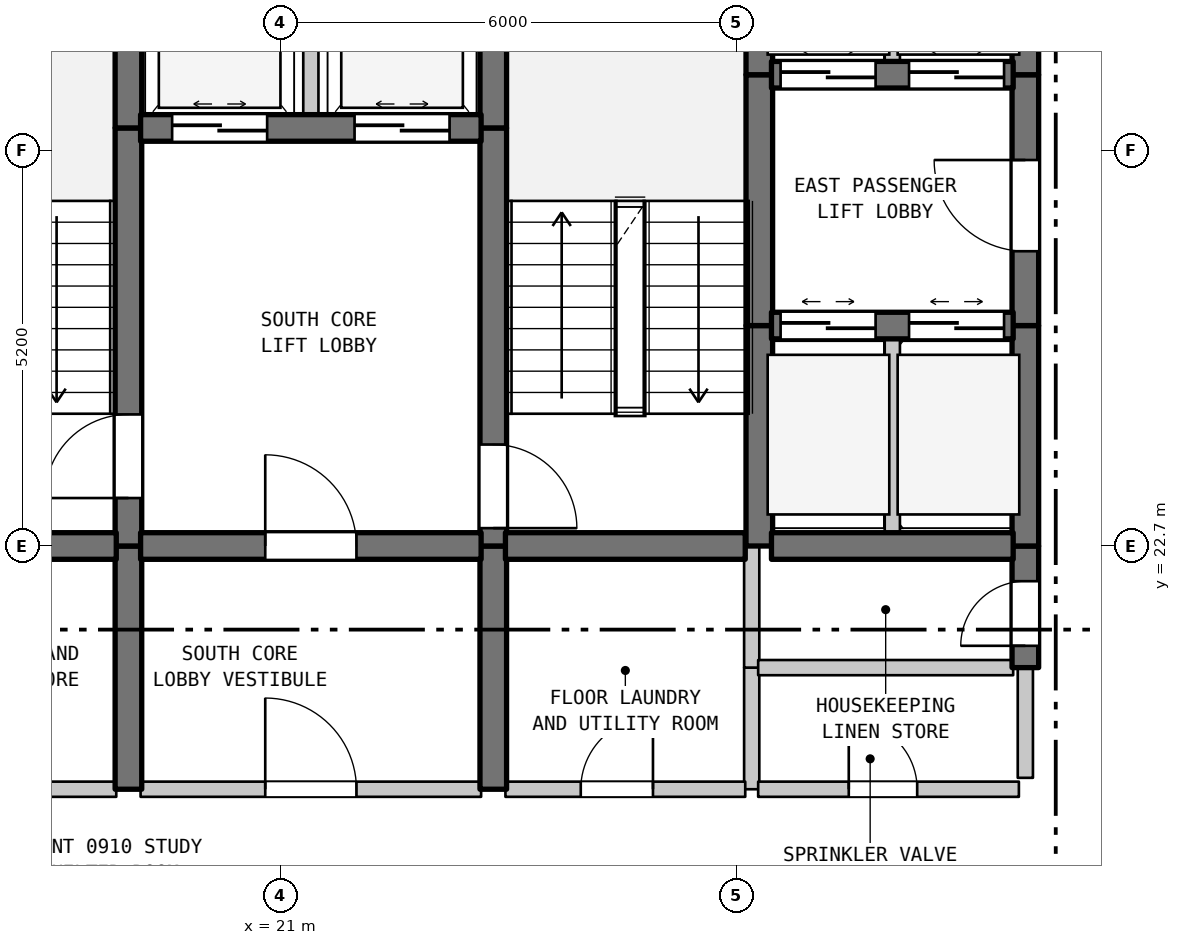
"""IFC4 building model, lengths in metres.
Left out: names, types, materials, properties, quantities, classifications, styles, units other than length and angle.
Written with IfcOpenShell. Run it as: python <this file> out.ifc"""

import sys

from ifc_helpers import new_model, si_unit, direction, frame, frame_2d, origin, place, context, subcontext, project, spatial, rectangle, extrude, element, fill, save


model = new_model("IFC4")
c1 = context("Model", 3, precision=1e-05, world=origin(), true_north=direction((0.0, 1.0)))
c2 = subcontext(c1, "Body", "Model", "MODEL_VIEW")
j1 = project(units=[si_unit("LENGTHUNIT", "METRE"), si_unit("PLANEANGLEUNIT", "RADIAN")], contexts=[c1])
p1 = place(None, origin())
s1 = spatial("IfcSite", under=j1, at=p1, CompositionType="ELEMENT")
p2 = place(p1, origin())
s2 = spatial("IfcBuilding", under=s1, at=p2, CompositionType="ELEMENT")
p3 = place(p2, frame((0.0, 0.0, 42.5)))
s3 = spatial("IfcBuildingStorey", under=s2, at=p3, CompositionType="ELEMENT", Elevation=42.5)
p4 = place(p3, frame((19.0, 19.5, 0.0), z_axis=(0.0, 0.0, 1.0), x_axis=(0.0, 1.0, 0.0)))
e1 = element("IfcWall", 1, at=p4, inside=s3, PredefinedType="SHEAR", context=c2, shape_type="SweptSolid", body=[
    extrude(rectangle(XDim=3.2, YDim=0.35, at=frame_2d((1.6, 0.0))), origin(), (0.0, 0.0, 1.0), 3.385),
])
p5 = place(p3, frame((19.0, 22.7, 0.0), z_axis=(0.0, 0.0, 1.0), x_axis=(0.0, 1.0, 0.0)))
e2 = element("IfcWall", 2, at=p5, inside=s3, PredefinedType="SHEAR", context=c2, shape_type="SweptSolid", body=[
    extrude(rectangle(XDim=5.5, YDim=0.35, at=frame_2d((2.75, 0.0))), origin(), (0.0, 0.0, 1.0), 3.385),
])
p6 = place(p5, frame((0.631, 0.0, 0.0)))
e3 = element("IfcOpeningElement", 3, at=p6, cuts=e2, PredefinedType="OPENING", context=c2, shape_type="SweptSolid", body=[
    extrude(rectangle(XDim=1.1, YDim=2.15, at=frame_2d((0.55, 1.075))), frame((0.0, 0.185, 0.0), z_axis=(0.0, -1.0, 0.0), x_axis=(1.0, 0.0, 0.0)), (0.0, 0.0, 1.0), 0.37),
])
p7 = place(p3, frame((19.0, 28.2, 0.0), z_axis=(0.0, 0.0, 1.0), x_axis=(0.0, 1.0, 0.0)))
e4 = element("IfcWall", 4, at=p7, inside=s3, PredefinedType="SHEAR", context=c2, shape_type="SweptSolid", body=[
    extrude(rectangle(XDim=1.3, YDim=0.35, at=frame_2d((0.65, 0.0))), origin(), (0.0, 0.0, 1.0), 3.385),
])
p8 = place(p3, frame((21.4, 28.2, 0.0), z_axis=(0.0, 0.0, 1.0), x_axis=(0.0, 1.0, 0.0)))
e5 = element("IfcWall", 5, at=p8, inside=s3, PredefinedType="STANDARD", context=c2, shape_type="SweptSolid", body=[
    extrude(rectangle(XDim=2.6, YDim=0.2, at=frame_2d((1.3, 0.0))), origin(), (0.0, 0.0, 1.0), 3.385),
])
p9 = place(p3, frame((23.8, 19.5, 0.0), z_axis=(0.0, 0.0, 1.0), x_axis=(0.0, 1.0, 0.0)))
e6 = element("IfcWall", 6, at=p9, inside=s3, PredefinedType="SHEAR", context=c2, shape_type="SweptSolid", body=[
    extrude(rectangle(XDim=3.2, YDim=0.35, at=frame_2d((1.6, 0.0))), origin(), (0.0, 0.0, 1.0), 3.385),
])
p10 = place(p3, frame((23.8, 22.7, 0.0), z_axis=(0.0, 0.0, 1.0), x_axis=(0.0, 1.0, 0.0)))
e7 = element("IfcWall", 7, at=p10, inside=s3, PredefinedType="SHEAR", context=c2, shape_type="SweptSolid", body=[
    extrude(rectangle(XDim=5.5, YDim=0.35, at=frame_2d((2.75, 0.0))), origin(), (0.0, 0.0, 1.0), 3.385),
])
p11 = place(p10, frame((0.235, 0.0, 0.0)))
e8 = element("IfcOpeningElement", 8, at=p11, cuts=e7, PredefinedType="OPENING", context=c2, shape_type="SweptSolid", body=[
    extrude(rectangle(XDim=1.1, YDim=2.15, at=frame_2d((0.55, 1.075))), frame((0.0, 0.185, 0.0), z_axis=(0.0, -1.0, 0.0), x_axis=(1.0, 0.0, 0.0)), (0.0, 0.0, 1.0), 0.37),
])
p12 = place(p3, frame((23.8, 28.2, 0.0), z_axis=(0.0, 0.0, 1.0), x_axis=(0.0, 1.0, 0.0)))
e9 = element("IfcWall", 9, at=p12, inside=s3, PredefinedType="SHEAR", context=c2, shape_type="SweptSolid", body=[
    extrude(rectangle(XDim=1.3, YDim=0.35, at=frame_2d((0.65, 0.0))), origin(), (0.0, 0.0, 1.0), 3.385),
])
p13 = place(p3, frame((27.2, 19.5, 0.0), z_axis=(0.0, 0.0, 1.0), x_axis=(0.0, 1.0, 0.0)))
e10 = element("IfcWall", 10, at=p13, inside=s3, PredefinedType="STANDARD", context=c2, shape_type="SweptSolid", body=[
    extrude(rectangle(XDim=1.6, YDim=0.2, at=frame_2d((0.8, 0.0))), origin(), (0.0, 0.0, 1.0), 3.385),
])
p14 = place(p3, frame((27.2, 21.1, 0.0), z_axis=(0.0, 0.0, 1.0), x_axis=(0.0, 1.0, 0.0)))
e11 = element("IfcWall", 11, at=p14, inside=s3, PredefinedType="STANDARD", context=c2, shape_type="SweptSolid", body=[
    extrude(rectangle(XDim=1.6, YDim=0.2, at=frame_2d((0.8, 0.0))), origin(), (0.0, 0.0, 1.0), 3.385),
])
p15 = place(p3, frame((27.3, 22.7, 0.0), z_axis=(0.0, 0.0, 1.0), x_axis=(0.0, 1.0, 0.0)))
e12 = element("IfcWall", 12, at=p15, inside=s3, PredefinedType="SHEAR", context=c2, shape_type="SweptSolid", body=[
    extrude(rectangle(XDim=2.9, YDim=0.35, at=frame_2d((1.45, 0.0))), origin(), (0.0, 0.0, 1.0), 3.385),
])
p16 = place(p3, frame((27.3, 25.6, 0.0), z_axis=(0.0, 0.0, 1.0), x_axis=(0.0, 1.0, 0.0)))
e13 = element("IfcWall", 13, at=p16, inside=s3, PredefinedType="SHEAR", context=c2, shape_type="SweptSolid", body=[
    extrude(rectangle(XDim=3.3, YDim=0.35, at=frame_2d((1.65, 0.0))), origin(), (0.0, 0.0, 1.0), 3.385),
])
p17 = place(p3, frame((27.3, 28.9, 0.0), z_axis=(0.0, 0.0, 1.0), x_axis=(0.0, 1.0, 0.0)))
e14 = element("IfcWall", 14, at=p17, inside=s3, PredefinedType="SHEAR", context=c2, shape_type="SweptSolid", body=[
    extrude(rectangle(XDim=0.6, YDim=0.35, at=frame_2d((0.3, 0.0))), origin(), (0.0, 0.0, 1.0), 3.385),
])
p18 = place(p3, frame((29.05, 22.7, 0.0), z_axis=(0.0, 0.0, 1.0), x_axis=(0.0, 1.0, 0.0)))
e15 = element("IfcWall", 15, at=p18, inside=s3, PredefinedType="STANDARD", context=c2, shape_type="SweptSolid", body=[
    extrude(rectangle(XDim=2.9, YDim=0.2, at=frame_2d((1.45, 0.0))), origin(), (0.0, 0.0, 1.0), 3.385),
])
p19 = place(p3, frame((29.05, 28.9, 0.0), z_axis=(0.0, 0.0, 1.0), x_axis=(0.0, 1.0, 0.0)))
e16 = element("IfcWall", 16, at=p19, inside=s3, PredefinedType="STANDARD", context=c2, shape_type="SweptSolid", body=[
    extrude(rectangle(XDim=2.6, YDim=0.2, at=frame_2d((1.3, 0.0))), origin(), (0.0, 0.0, 1.0), 3.385),
])
p20 = place(p3, frame((30.8, 19.65, 0.0), z_axis=(0.0, 0.0, 1.0), x_axis=(0.0, 1.0, 0.0)))
e17 = element("IfcWall", 17, at=p20, inside=s3, PredefinedType="STANDARD", context=c2, shape_type="SweptSolid", body=[
    extrude(rectangle(XDim=1.45, YDim=0.2, at=frame_2d((0.725, 0.0))), origin(), (0.0, 0.0, 1.0), 3.385),
])
p21 = place(p3, frame((30.8, 21.1, 0.0), z_axis=(0.0, 0.0, 1.0), x_axis=(0.0, 1.0, 0.0)))
e18 = element("IfcWall", 18, at=p21, inside=s3, PredefinedType="SHEAR", context=c2, shape_type="SweptSolid", body=[
    extrude(rectangle(XDim=1.6, YDim=0.35, at=frame_2d((0.8, 0.0))), origin(), (0.0, 0.0, 1.0), 3.385),
])
p22 = place(p21, frame((0.287, 0.0, 0.0)))
e19 = element("IfcOpeningElement", 19, at=p22, cuts=e18, PredefinedType="OPENING", context=c2, shape_type="SweptSolid", body=[
    extrude(rectangle(XDim=0.85, YDim=2.1, at=frame_2d((0.425, 1.05))), frame((0.0, 0.185, 0.0), z_axis=(0.0, -1.0, 0.0), x_axis=(1.0, 0.0, 0.0)), (0.0, 0.0, 1.0), 0.37),
])
p23 = place(p3, frame((30.8, 22.7, 0.0), z_axis=(0.0, 0.0, 1.0), x_axis=(0.0, 1.0, 0.0)))
e20 = element("IfcWall", 20, at=p23, inside=s3, PredefinedType="SHEAR", context=c2, shape_type="SweptSolid", body=[
    extrude(rectangle(XDim=2.9, YDim=0.35, at=frame_2d((1.45, 0.0))), origin(), (0.0, 0.0, 1.0), 3.385),
])
p24 = place(p3, frame((30.8, 25.6, 0.0), z_axis=(0.0, 0.0, 1.0), x_axis=(0.0, 1.0, 0.0)))
e21 = element("IfcWall", 21, at=p24, inside=s3, PredefinedType="SHEAR", context=c2, shape_type="SweptSolid", body=[
    extrude(rectangle(XDim=3.3, YDim=0.35, at=frame_2d((1.65, 0.0))), origin(), (0.0, 0.0, 1.0), 3.385),
])
p25 = place(p24, frame((0.978, 0.0, 0.0)))
e22 = element("IfcOpeningElement", 22, at=p25, cuts=e21, PredefinedType="OPENING", context=c2, shape_type="SweptSolid", body=[
    extrude(rectangle(XDim=1.2, YDim=2.2, at=frame_2d((0.6, 1.1))), frame((0.0, 0.185, 0.0), z_axis=(0.0, -1.0, 0.0), x_axis=(1.0, 0.0, 0.0)), (0.0, 0.0, 1.0), 0.37),
])
p26 = place(p3, frame((30.8, 28.9, 0.0), z_axis=(0.0, 0.0, 1.0), x_axis=(0.0, 1.0, 0.0)))
e23 = element("IfcWall", 23, at=p26, inside=s3, PredefinedType="SHEAR", context=c2, shape_type="SweptSolid", body=[
    extrude(rectangle(XDim=2.6, YDim=0.35, at=frame_2d((1.3, 0.0))), origin(), (0.0, 0.0, 1.0), 3.385),
])
p27 = place(p3, frame((15.16, 19.5, 0.0), z_axis=(0.0, 0.0, 1.0), x_axis=(1.0, 0.0, 0.0)))
e24 = element("IfcWall", 24, at=p27, inside=s3, PredefinedType="STANDARD", context=c2, shape_type="SweptSolid", body=[
    extrude(rectangle(XDim=3.68, YDim=0.2, at=frame_2d((1.84, 0.0))), origin(), (0.0, 0.0, 1.0), 3.385),
])
p28 = place(p27, frame((1.39, 0.0, 0.0)))
e25 = element("IfcOpeningElement", 25, at=p28, cuts=e24, PredefinedType="OPENING", context=c2, shape_type="SweptSolid", body=[
    extrude(rectangle(XDim=0.9, YDim=2.15, at=frame_2d((0.45, 1.075))), frame((0.0, 0.11, 0.0), z_axis=(0.0, -1.0, 0.0), x_axis=(1.0, 0.0, 0.0)), (0.0, 0.0, 1.0), 0.22),
])
p29 = place(p3, frame((19.16, 19.5, 0.0), z_axis=(0.0, 0.0, 1.0), x_axis=(1.0, 0.0, 0.0)))
e26 = element("IfcWall", 26, at=p29, inside=s3, PredefinedType="STANDARD", context=c2, shape_type="SweptSolid", body=[
    extrude(rectangle(XDim=4.48, YDim=0.2, at=frame_2d((2.24, 0.0))), origin(), (0.0, 0.0, 1.0), 3.385),
])
p30 = place(p29, frame((1.64, 0.0, 0.0)))
e27 = element("IfcOpeningElement", 27, at=p30, cuts=e26, PredefinedType="OPENING", context=c2, shape_type="SweptSolid", body=[
    extrude(rectangle(XDim=1.2, YDim=2.2, at=frame_2d((0.6, 1.1))), frame((0.0, 0.11, 0.0), z_axis=(0.0, -1.0, 0.0), x_axis=(1.0, 0.0, 0.0)), (0.0, 0.0, 1.0), 0.22),
])
p31 = place(p3, frame((23.96, 19.5, 0.0), z_axis=(0.0, 0.0, 1.0), x_axis=(1.0, 0.0, 0.0)))
e28 = element("IfcWall", 28, at=p31, inside=s3, PredefinedType="STANDARD", context=c2, shape_type="SweptSolid", body=[
    extrude(rectangle(XDim=3.155, YDim=0.2, at=frame_2d((1.578, 0.0))), origin(), (0.0, 0.0, 1.0), 3.385),
])
p32 = place(p31, frame((0.991, 0.0, 0.0)))
e29 = element("IfcOpeningElement", 29, at=p32, cuts=e28, PredefinedType="OPENING", context=c2, shape_type="SweptSolid", body=[
    extrude(rectangle(XDim=0.95, YDim=2.15, at=frame_2d((0.475, 1.075))), frame((0.0, 0.11, 0.0), z_axis=(0.0, -1.0, 0.0), x_axis=(1.0, 0.0, 0.0)), (0.0, 0.0, 1.0), 0.22),
])
p33 = place(p3, frame((27.285, 19.5, 0.0), z_axis=(0.0, 0.0, 1.0), x_axis=(1.0, 0.0, 0.0)))
e30 = element("IfcWall", 30, at=p33, inside=s3, PredefinedType="STANDARD", context=c2, shape_type="SweptSolid", body=[
    extrude(rectangle(XDim=3.43, YDim=0.2, at=frame_2d((1.715, 0.0))), origin(), (0.0, 0.0, 1.0), 3.385),
])
p34 = place(p33, frame((1.192, 0.0, 0.0)))
e31 = element("IfcOpeningElement", 31, at=p34, cuts=e30, PredefinedType="OPENING", context=c2, shape_type="SweptSolid", body=[
    extrude(rectangle(XDim=0.9, YDim=2.15, at=frame_2d((0.45, 1.075))), frame((0.0, 0.11, 0.0), z_axis=(0.0, -1.0, 0.0), x_axis=(1.0, 0.0, 0.0)), (0.0, 0.0, 1.0), 0.22),
])
p35 = place(p3, frame((27.285, 21.1, 0.0), z_axis=(0.0, 0.0, 1.0), x_axis=(1.0, 0.0, 0.0)))
e32 = element("IfcWall", 32, at=p35, inside=s3, PredefinedType="STANDARD", context=c2, shape_type="SweptSolid", body=[
    extrude(rectangle(XDim=3.355, YDim=0.2, at=frame_2d((1.677, 0.0))), origin(), (0.0, 0.0, 1.0), 3.385),
])
p36 = place(p3, frame((15.16, 22.7, 0.0), z_axis=(0.0, 0.0, 1.0), x_axis=(1.0, 0.0, 0.0)))
e33 = element("IfcWall", 33, at=p36, inside=s3, PredefinedType="SHEAR", context=c2, shape_type="SweptSolid", body=[
    extrude(rectangle(XDim=3.68, YDim=0.35, at=frame_2d((1.84, 0.0))), origin(), (0.0, 0.0, 1.0), 3.385),
])
p37 = place(p3, frame((19.16, 22.7, 0.0), z_axis=(0.0, 0.0, 1.0), x_axis=(1.0, 0.0, 0.0)))
e34 = element("IfcWall", 34, at=p37, inside=s3, PredefinedType="SHEAR", context=c2, shape_type="SweptSolid", body=[
    extrude(rectangle(XDim=4.48, YDim=0.35, at=frame_2d((2.24, 0.0))), origin(), (0.0, 0.0, 1.0), 3.385),
])
p38 = place(p37, frame((1.64, 0.0, 0.0)))
e35 = element("IfcOpeningElement", 35, at=p38, cuts=e34, PredefinedType="OPENING", context=c2, shape_type="SweptSolid", body=[
    extrude(rectangle(XDim=1.2, YDim=2.2, at=frame_2d((0.6, 1.1))), frame((0.0, 0.185, 0.0), z_axis=(0.0, -1.0, 0.0), x_axis=(1.0, 0.0, 0.0)), (0.0, 0.0, 1.0), 0.37),
])
p39 = place(p3, frame((23.96, 22.7, 0.0), z_axis=(0.0, 0.0, 1.0), x_axis=(1.0, 0.0, 0.0)))
e36 = element("IfcWall", 36, at=p39, inside=s3, PredefinedType="SHEAR", context=c2, shape_type="SweptSolid", body=[
    extrude(rectangle(XDim=3.155, YDim=0.35, at=frame_2d((1.578, 0.0))), origin(), (0.0, 0.0, 1.0), 3.385),
])
p40 = place(p3, frame((27.46, 22.7, 0.0), z_axis=(0.0, 0.0, 1.0), x_axis=(1.0, 0.0, 0.0)))
e37 = element("IfcWall", 37, at=p40, inside=s3, PredefinedType="SHEAR", context=c2, shape_type="SweptSolid", body=[
    extrude(rectangle(XDim=3.18, YDim=0.35, at=frame_2d((1.59, 0.0))), origin(), (0.0, 0.0, 1.0), 3.385),
])
p41 = place(p3, frame((27.46, 25.6, 0.0), z_axis=(0.0, 0.0, 1.0), x_axis=(1.0, 0.0, 0.0)))
e38 = element("IfcWall", 38, at=p41, inside=s3, PredefinedType="SHEAR", context=c2, shape_type="SweptSolid", body=[
    extrude(rectangle(XDim=3.18, YDim=0.35, at=frame_2d((1.59, 0.0))), origin(), (0.0, 0.0, 1.0), 3.385),
])
p42 = place(p41, frame((0.12, 0.0, 0.0)))
e39 = element("IfcOpeningElement", 39, at=p42, cuts=e38, PredefinedType="OPENING", context=c2, shape_type="SweptSolid", body=[
    extrude(rectangle(XDim=1.25, YDim=2.2, at=frame_2d((0.625, 1.1))), frame((0.0, 0.185, 0.0), z_axis=(0.0, -1.0, 0.0), x_axis=(1.0, 0.0, 0.0)), (0.0, 0.0, 1.0), 0.37),
])
p43 = place(p41, frame((1.81, 0.0, 0.0)))
e40 = element("IfcOpeningElement", 40, at=p43, cuts=e38, PredefinedType="OPENING", context=c2, shape_type="SweptSolid", body=[
    extrude(rectangle(XDim=1.25, YDim=2.2, at=frame_2d((0.625, 1.1))), frame((0.0, 0.185, 0.0), z_axis=(0.0, -1.0, 0.0), x_axis=(1.0, 0.0, 0.0)), (0.0, 0.0, 1.0), 0.37),
])
p44 = place(p3, frame((19.16, 28.2, 0.0), z_axis=(0.0, 0.0, 1.0), x_axis=(1.0, 0.0, 0.0)))
e41 = element("IfcWall", 41, at=p44, inside=s3, PredefinedType="SHEAR", context=c2, shape_type="SweptSolid", body=[
    extrude(rectangle(XDim=4.48, YDim=0.35, at=frame_2d((2.24, 0.0))), origin(), (0.0, 0.0, 1.0), 3.385),
])
p45 = place(p44, frame((0.415, 0.0, 0.0)))
e42 = element("IfcOpeningElement", 42, at=p45, cuts=e41, PredefinedType="OPENING", context=c2, shape_type="SweptSolid", body=[
    extrude(rectangle(XDim=1.25, YDim=2.2, at=frame_2d((0.625, 1.1))), frame((0.0, 0.185, 0.0), z_axis=(0.0, -1.0, 0.0), x_axis=(1.0, 0.0, 0.0)), (0.0, 0.0, 1.0), 0.37),
])
p46 = place(p44, frame((2.815, 0.0, 0.0)))
e43 = element("IfcOpeningElement", 43, at=p46, cuts=e41, PredefinedType="OPENING", context=c2, shape_type="SweptSolid", body=[
    extrude(rectangle(XDim=1.25, YDim=2.2, at=frame_2d((0.625, 1.1))), frame((0.0, 0.185, 0.0), z_axis=(0.0, -1.0, 0.0), x_axis=(1.0, 0.0, 0.0)), (0.0, 0.0, 1.0), 0.37),
])
p47 = place(p3, frame((27.46, 28.9, 0.0), z_axis=(0.0, 0.0, 1.0), x_axis=(1.0, 0.0, 0.0)))
e44 = element("IfcWall", 44, at=p47, inside=s3, PredefinedType="SHEAR", context=c2, shape_type="SweptSolid", body=[
    extrude(rectangle(XDim=3.18, YDim=0.35, at=frame_2d((1.59, 0.0))), origin(), (0.0, 0.0, 1.0), 3.385),
])
p48 = place(p47, frame((0.12, 0.0, 0.0)))
e45 = element("IfcOpeningElement", 45, at=p48, cuts=e44, PredefinedType="OPENING", context=c2, shape_type="SweptSolid", body=[
    extrude(rectangle(XDim=1.25, YDim=2.2, at=frame_2d((0.625, 1.1))), frame((0.0, 0.185, 0.0), z_axis=(0.0, -1.0, 0.0), x_axis=(1.0, 0.0, 0.0)), (0.0, 0.0, 1.0), 0.37),
])
p49 = place(p47, frame((1.81, 0.0, 0.0)))
e46 = element("IfcOpeningElement", 46, at=p49, cuts=e44, PredefinedType="OPENING", context=c2, shape_type="SweptSolid", body=[
    extrude(rectangle(XDim=1.25, YDim=2.2, at=frame_2d((0.625, 1.1))), frame((0.0, 0.185, 0.0), z_axis=(0.0, -1.0, 0.0), x_axis=(1.0, 0.0, 0.0)), (0.0, 0.0, 1.0), 0.37),
])
p50 = place(p6, origin())
e47 = element("IfcDoor", 47, at=p50, inside=s3, OperationType="SINGLE_SWING_LEFT", PredefinedType="DOOR", context=c2, shape_type="SweptSolid", body=[
    extrude(rectangle(XDim=1.1, YDim=2.15, at=frame_2d((0.55, 1.075))), frame((0.0, 0.025, 0.0), z_axis=(0.0, -1.0, 0.0), x_axis=(1.0, 0.0, 0.0)), (0.0, 0.0, 1.0), 0.05),
])
fill(e3, e47)
p51 = place(p11, frame((1.1, 0.0, 0.0), z_axis=(0.0, 0.0, 1.0), x_axis=(-1.0, 0.0, 0.0)))
e48 = element("IfcDoor", 48, at=p51, inside=s3, OperationType="SINGLE_SWING_LEFT", PredefinedType="DOOR", context=c2, shape_type="SweptSolid", body=[
    extrude(rectangle(XDim=1.1, YDim=2.15, at=frame_2d((0.55, 1.075))), frame((0.0, 0.025, 0.0), z_axis=(0.0, -1.0, 0.0), x_axis=(1.0, 0.0, 0.0)), (0.0, 0.0, 1.0), 0.05),
])
fill(e8, e48)
p52 = place(p22, origin())
e49 = element("IfcDoor", 49, at=p52, inside=s3, OperationType="SINGLE_SWING_LEFT", PredefinedType="DOOR", context=c2, shape_type="SweptSolid", body=[
    extrude(rectangle(XDim=0.85, YDim=2.1, at=frame_2d((0.425, 1.05))), frame((0.0, 0.025, 0.0), z_axis=(0.0, -1.0, 0.0), x_axis=(1.0, 0.0, 0.0)), (0.0, 0.0, 1.0), 0.05),
])
fill(e19, e49)
p53 = place(p25, origin())
e50 = element("IfcDoor", 50, at=p53, inside=s3, OperationType="SINGLE_SWING_RIGHT", PredefinedType="DOOR", context=c2, shape_type="SweptSolid", body=[
    extrude(rectangle(XDim=1.2, YDim=2.2, at=frame_2d((0.6, 1.1))), frame((0.0, 0.025, 0.0), z_axis=(0.0, -1.0, 0.0), x_axis=(1.0, 0.0, 0.0)), (0.0, 0.0, 1.0), 0.05),
])
fill(e22, e50)
p54 = place(p30, origin())
e51 = element("IfcDoor", 51, at=p54, inside=s3, OperationType="SINGLE_SWING_LEFT", PredefinedType="DOOR", context=c2, shape_type="SweptSolid", body=[
    extrude(rectangle(XDim=1.2, YDim=2.2, at=frame_2d((0.6, 1.1))), frame((0.0, 0.025, 0.0), z_axis=(0.0, -1.0, 0.0), x_axis=(1.0, 0.0, 0.0)), (0.0, 0.0, 1.0), 0.05),
])
fill(e27, e51)
p55 = place(p32, origin())
e52 = element("IfcDoor", 52, at=p55, inside=s3, OperationType="SINGLE_SWING_RIGHT", PredefinedType="DOOR", context=c2, shape_type="SweptSolid", body=[
    extrude(rectangle(XDim=0.95, YDim=2.15, at=frame_2d((0.475, 1.075))), frame((0.0, 0.025, 0.0), z_axis=(0.0, -1.0, 0.0), x_axis=(1.0, 0.0, 0.0)), (0.0, 0.0, 1.0), 0.05),
])
fill(e29, e52)
p56 = place(p34, origin())
e53 = element("IfcDoor", 53, at=p56, inside=s3, OperationType="SINGLE_SWING_LEFT", PredefinedType="DOOR", context=c2, shape_type="SweptSolid", body=[
    extrude(rectangle(XDim=0.9, YDim=2.15, at=frame_2d((0.45, 1.075))), frame((0.0, 0.025, 0.0), z_axis=(0.0, -1.0, 0.0), x_axis=(1.0, 0.0, 0.0)), (0.0, 0.0, 1.0), 0.05),
])
fill(e31, e53)
p57 = place(p38, origin())
e54 = element("IfcDoor", 54, at=p57, inside=s3, OperationType="SINGLE_SWING_LEFT", PredefinedType="DOOR", context=c2, shape_type="SweptSolid", body=[
    extrude(rectangle(XDim=1.2, YDim=2.2, at=frame_2d((0.6, 1.1))), frame((0.0, 0.025, 0.0), z_axis=(0.0, -1.0, 0.0), x_axis=(1.0, 0.0, 0.0)), (0.0, 0.0, 1.0), 0.05),
])
fill(e35, e54)
p58 = place(p42, origin())
e55 = element("IfcDoor", 55, at=p58, inside=s3, OperationType="DOUBLE_DOOR_SLIDING", PredefinedType="DOOR", context=c2, shape_type="SweptSolid", body=[
    extrude(rectangle(XDim=1.25, YDim=2.2, at=frame_2d((0.625, 1.1))), frame((0.0, 0.025, 0.0), z_axis=(0.0, -1.0, 0.0), x_axis=(1.0, 0.0, 0.0)), (0.0, 0.0, 1.0), 0.05),
])
fill(e39, e55)
p59 = place(p43, origin())
e56 = element("IfcDoor", 56, at=p59, inside=s3, OperationType="DOUBLE_DOOR_SLIDING", PredefinedType="DOOR", context=c2, shape_type="SweptSolid", body=[
    extrude(rectangle(XDim=1.25, YDim=2.2, at=frame_2d((0.625, 1.1))), frame((0.0, 0.025, 0.0), z_axis=(0.0, -1.0, 0.0), x_axis=(1.0, 0.0, 0.0)), (0.0, 0.0, 1.0), 0.05),
])
fill(e40, e56)
p60 = place(p45, origin())
e57 = element("IfcDoor", 57, at=p60, inside=s3, OperationType="DOUBLE_DOOR_SLIDING", PredefinedType="DOOR", context=c2, shape_type="SweptSolid", body=[
    extrude(rectangle(XDim=1.25, YDim=2.2, at=frame_2d((0.625, 1.1))), frame((0.0, 0.025, 0.0), z_axis=(0.0, -1.0, 0.0), x_axis=(1.0, 0.0, 0.0)), (0.0, 0.0, 1.0), 0.05),
])
fill(e42, e57)
p61 = place(p46, origin())
e58 = element("IfcDoor", 58, at=p61, inside=s3, OperationType="DOUBLE_DOOR_SLIDING", PredefinedType="DOOR", context=c2, shape_type="SweptSolid", body=[
    extrude(rectangle(XDim=1.25, YDim=2.2, at=frame_2d((0.625, 1.1))), frame((0.0, 0.025, 0.0), z_axis=(0.0, -1.0, 0.0), x_axis=(1.0, 0.0, 0.0)), (0.0, 0.0, 1.0), 0.05),
])
fill(e43, e58)
p62 = place(p48, origin())
e59 = element("IfcDoor", 59, at=p62, inside=s3, OperationType="DOUBLE_DOOR_SLIDING", PredefinedType="DOOR", context=c2, shape_type="SweptSolid", body=[
    extrude(rectangle(XDim=1.25, YDim=2.2, at=frame_2d((0.625, 1.1))), frame((0.0, 0.025, 0.0), z_axis=(0.0, -1.0, 0.0), x_axis=(1.0, 0.0, 0.0)), (0.0, 0.0, 1.0), 0.05),
])
fill(e45, e59)
p63 = place(p49, origin())
e60 = element("IfcDoor", 60, at=p63, inside=s3, OperationType="DOUBLE_DOOR_SLIDING", PredefinedType="DOOR", context=c2, shape_type="SweptSolid", body=[
    extrude(rectangle(XDim=1.25, YDim=2.2, at=frame_2d((0.625, 1.1))), frame((0.0, 0.025, 0.0), z_axis=(0.0, -1.0, 0.0), x_axis=(1.0, 0.0, 0.0)), (0.0, 0.0, 1.0), 0.05),
])
fill(e46, e60)
save(model, sys.argv[1])
